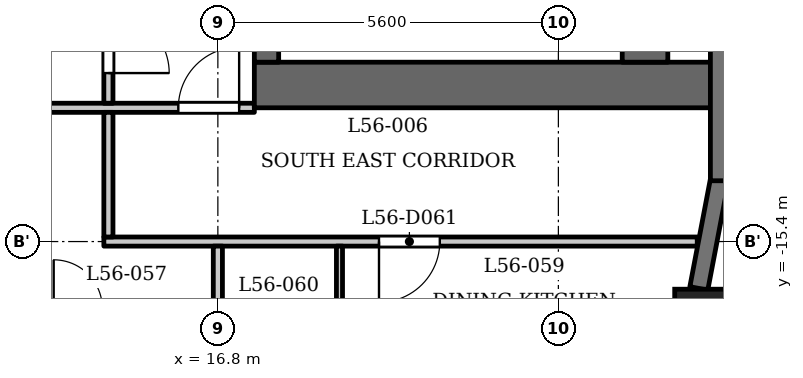
"""IFC4 building model, lengths in metres.
Left out: names, types, materials, properties, quantities, classifications, styles, units other than length and angle.
Written with IfcOpenShell. Run it as: python <this file> out.ifc"""

import sys

from ifc_helpers import new_model, si_unit, direction, frame, frame_2d, origin, origin_2d, place, context, subcontext, project, spatial, rectangle, extrude, element, fill, save


model = new_model("IFC4")
c1 = context("Model", 3, precision=1e-05, world=origin(), true_north=direction((0.0, 1.0)))
c2 = subcontext(c1, "Body", "Model", "MODEL_VIEW")
j1 = project(units=[si_unit("LENGTHUNIT", "METRE"), si_unit("PLANEANGLEUNIT", "RADIAN")], contexts=[c1])
p1 = place(None, origin())
s1 = spatial("IfcSite", under=j1, at=p1, CompositionType="ELEMENT")
p2 = place(p1, origin())
s2 = spatial("IfcBuilding", under=s1, at=p2, CompositionType="ELEMENT")
p3 = place(p2, frame((0.0, 0.0, 216.9)))
s3 = spatial("IfcBuildingStorey", under=s2, at=p3, CompositionType="ELEMENT", Elevation=216.9)
p4 = place(p3, frame((24.738, -16.609, 0.0), z_axis=(0.0, 0.0, 1.0), x_axis=(1.0, 0.0, 0.0)))
e1 = element("IfcColumn", 1, at=p4, inside=s3, PredefinedType="COLUMN", context=c2, shape_type="SweptSolid", body=[
    extrude(rectangle(XDim=0.85, YDim=0.85, at=origin_2d()), origin(), (0.0, 0.0, 1.0), 3.5),
])
p5 = place(p3, frame((24.709, -16.171, 0.0), z_axis=(0.0, 0.0, 1.0), x_axis=(0.187442908742, 0.982275499014, 0.0)))
e2 = element("IfcWall", 2, at=p5, inside=s3, PredefinedType="SOLIDWALL", context=c2, shape_type="SweptSolid", body=[
    extrude(rectangle(XDim=1.831, YDim=0.3, at=frame_2d((0.916, 0.0))), origin(), (0.0, 0.0, 1.0), 2.5),
])
p6 = place(p3, frame((25.05, -14.4, 0.0), z_axis=(0.0, 0.0, 1.0), x_axis=(0.0, 1.0, 0.0)))
e3 = element("IfcWall", 3, at=p6, inside=s3, PredefinedType="SOLIDWALL", context=c2, shape_type="SweptSolid", body=[
    extrude(rectangle(XDim=2.775, YDim=0.3, at=frame_2d((1.387, 0.0))), origin(), (0.0, 0.0, 1.0), 2.5),
])
p7 = place(p3, frame((17.4, -12.825, 0.0), z_axis=(0.0, 0.0, 1.0), x_axis=(1.0, 0.0, 0.0)))
e4 = element("IfcWall", 4, at=p7, inside=s3, PredefinedType="SHEAR", context=c2, shape_type="SweptSolid", body=[
    extrude(rectangle(XDim=7.6, YDim=0.75, at=frame_2d((3.8, 0.0))), origin(), (0.0, 0.0, 1.0), 3.2),
])
p8 = place(p3, frame((17.6, -12.45, 0.0), z_axis=(0.0, 0.0, 1.0), x_axis=(0.0, 1.0, 0.0)))
e5 = element("IfcWall", 5, at=p8, inside=s3, PredefinedType="SHEAR", context=c2, shape_type="SweptSolid", body=[
    extrude(rectangle(XDim=24.9, YDim=0.4, at=frame_2d((12.45, 0.0))), origin(), (0.0, 0.0, 1.0), 3.2),
])
p9 = place(p8, frame((6.85, 0.0, 0.0)))
e6 = element("IfcOpeningElement", 6, at=p9, cuts=e5, PredefinedType="OPENING", context=c2, shape_type="SweptSolid", body=[
    extrude(rectangle(XDim=0.9, YDim=2.1, at=frame_2d((0.45, 1.05))), frame((0.0, 0.21, 0.0), z_axis=(0.0, -1.0, 0.0), x_axis=(1.0, 0.0, 0.0)), (0.0, 0.0, 1.0), 0.42),
])
p10 = place(p8, frame((10.45, 0.0, 0.0)))
e7 = element("IfcOpeningElement", 7, at=p10, cuts=e5, PredefinedType="OPENING", context=c2, shape_type="SweptSolid", body=[
    extrude(rectangle(XDim=0.9, YDim=2.1, at=frame_2d((0.45, 1.05))), frame((0.0, 0.21, 0.0), z_axis=(0.0, -1.0, 0.0), x_axis=(1.0, 0.0, 0.0)), (0.0, 0.0, 1.0), 0.42),
])
p11 = place(p8, frame((15.6, 0.0, 0.0)))
e8 = element("IfcOpeningElement", 8, at=p11, cuts=e5, PredefinedType="OPENING", context=c2, shape_type="SweptSolid", body=[
    extrude(rectangle(XDim=1.1, YDim=2.1, at=frame_2d((0.55, 1.05))), frame((0.0, 0.21, 0.0), z_axis=(0.0, -1.0, 0.0), x_axis=(1.0, 0.0, 0.0)), (0.0, 0.0, 1.0), 0.42),
])
p12 = place(p8, frame((18.0, 0.0, 0.0)))
e9 = element("IfcOpeningElement", 9, at=p12, cuts=e5, PredefinedType="OPENING", context=c2, shape_type="SweptSolid", body=[
    extrude(rectangle(XDim=1.1, YDim=2.1, at=frame_2d((0.55, 1.05))), frame((0.0, 0.21, 0.0), z_axis=(0.0, -1.0, 0.0), x_axis=(1.0, 0.0, 0.0)), (0.0, 0.0, 1.0), 0.42),
])
p13 = place(p8, frame((23.025, 0.0, 0.0)))
e10 = element("IfcOpeningElement", 10, at=p13, cuts=e5, PredefinedType="OPENING", context=c2, shape_type="SweptSolid", body=[
    extrude(rectangle(XDim=1.1, YDim=2.1, at=frame_2d((0.55, 1.05))), frame((0.0, 0.21, 0.0), z_axis=(0.0, -1.0, 0.0), x_axis=(1.0, 0.0, 0.0)), (0.0, 0.0, 1.0), 0.42),
])
p14 = place(p8, frame((0.775, 0.0, 0.0)))
e11 = element("IfcOpeningElement", 11, at=p14, cuts=e5, PredefinedType="OPENING", context=c2, shape_type="SweptSolid", body=[
    extrude(rectangle(XDim=1.1, YDim=2.1, at=frame_2d((0.55, 1.05))), frame((0.0, 0.21, 0.0), z_axis=(0.0, -1.0, 0.0), x_axis=(1.0, 0.0, 0.0)), (0.0, 0.0, 1.0), 0.42),
])
p15 = place(p8, frame((12.925, 0.0, 0.0)))
e12 = element("IfcOpeningElement", 12, at=p15, cuts=e5, PredefinedType="OPENING", context=c2, shape_type="SweptSolid", body=[
    extrude(rectangle(XDim=1.8, YDim=2.1, at=frame_2d((0.9, 1.05))), frame((0.0, 0.21, 0.0), z_axis=(0.0, -1.0, 0.0), x_axis=(1.0, 0.0, 0.0)), (0.0, 0.0, 1.0), 0.42),
])
p16 = place(p3, frame((23.825, -12.45, 0.0), z_axis=(0.0, 0.0, 1.0), x_axis=(0.0, 1.0, 0.0)))
e13 = element("IfcWall", 13, at=p16, inside=s3, PredefinedType="SHEAR", context=c2, shape_type="SweptSolid", body=[
    extrude(rectangle(XDim=24.9, YDim=0.75, at=frame_2d((12.45, 0.0))), origin(), (0.0, 0.0, 1.0), 3.2),
])
p17 = place(p3, frame((14.925, -15.4, 0.0), z_axis=(0.0, 0.0, 1.0), x_axis=(1.0, 0.0, 0.0)))
e14 = element("IfcWall", 14, at=p17, inside=s3, PredefinedType="PARTITIONING", context=c2, shape_type="SweptSolid", body=[
    extrude(rectangle(XDim=9.759, YDim=0.15, at=frame_2d((4.879, 0.0))), origin(), (0.0, 0.0, 1.0), 3.2),
])
p18 = place(p17, frame((4.525, 0.0, 0.0)))
e15 = element("IfcOpeningElement", 15, at=p18, cuts=e14, PredefinedType="OPENING", context=c2, shape_type="SweptSolid", body=[
    extrude(rectangle(XDim=1.0, YDim=2.1, at=frame_2d((0.5, 1.05))), frame((0.0, 0.085, 0.0), z_axis=(0.0, -1.0, 0.0), x_axis=(1.0, 0.0, 0.0)), (0.0, 0.0, 1.0), 0.17),
])
p19 = place(p3, frame((-17.4, -13.2, 0.0), z_axis=(0.0, 0.0, 1.0), x_axis=(1.0, 0.0, 0.0)))
e16 = element("IfcWall", 16, at=p19, inside=s3, PredefinedType="PARTITIONING", context=c2, shape_type="SweptSolid", body=[
    extrude(rectangle(XDim=34.8, YDim=0.15, at=frame_2d((17.4, 0.0))), origin(), (0.0, 0.0, 1.0), 3.2),
])
p20 = place(p19, frame((0.15, 0.0, 0.0)))
e17 = element("IfcOpeningElement", 17, at=p20, cuts=e16, PredefinedType="OPENING", context=c2, shape_type="SweptSolid", body=[
    extrude(rectangle(XDim=1.0, YDim=2.1, at=frame_2d((0.5, 1.05))), frame((0.0, 0.085, 0.0), z_axis=(0.0, -1.0, 0.0), x_axis=(1.0, 0.0, 0.0)), (0.0, 0.0, 1.0), 0.17),
])
p21 = place(p19, frame((33.55, 0.0, 0.0)))
e18 = element("IfcOpeningElement", 18, at=p21, cuts=e16, PredefinedType="OPENING", context=c2, shape_type="SweptSolid", body=[
    extrude(rectangle(XDim=1.0, YDim=2.1, at=frame_2d((0.5, 1.05))), frame((0.0, 0.085, 0.0), z_axis=(0.0, -1.0, 0.0), x_axis=(1.0, 0.0, 0.0)), (0.0, 0.0, 1.0), 0.17),
])
p22 = place(p19, frame((3.7, 0.0, 0.0)))
e19 = element("IfcOpeningElement", 19, at=p22, cuts=e16, PredefinedType="OPENING", context=c2, shape_type="SweptSolid", body=[
    extrude(rectangle(XDim=1.0, YDim=2.1, at=frame_2d((0.5, 1.05))), frame((0.0, 0.085, 0.0), z_axis=(0.0, -1.0, 0.0), x_axis=(1.0, 0.0, 0.0)), (0.0, 0.0, 1.0), 0.17),
])
p23 = place(p19, frame((15.7, 0.0, 0.0)))
e20 = element("IfcOpeningElement", 20, at=p23, cuts=e16, PredefinedType="OPENING", context=c2, shape_type="SweptSolid", body=[
    extrude(rectangle(XDim=1.0, YDim=2.1, at=frame_2d((0.5, 1.05))), frame((0.0, 0.085, 0.0), z_axis=(0.0, -1.0, 0.0), x_axis=(1.0, 0.0, 0.0)), (0.0, 0.0, 1.0), 0.17),
])
p24 = place(p19, frame((21.3, 0.0, 0.0)))
e21 = element("IfcOpeningElement", 21, at=p24, cuts=e16, PredefinedType="OPENING", context=c2, shape_type="SweptSolid", body=[
    extrude(rectangle(XDim=1.0, YDim=2.1, at=frame_2d((0.5, 1.05))), frame((0.0, 0.085, 0.0), z_axis=(0.0, -1.0, 0.0), x_axis=(1.0, 0.0, 0.0)), (0.0, 0.0, 1.0), 0.17),
])
p25 = place(p19, frame((29.5, 0.0, 0.0)))
e22 = element("IfcOpeningElement", 22, at=p25, cuts=e16, PredefinedType="OPENING", context=c2, shape_type="SweptSolid", body=[
    extrude(rectangle(XDim=1.0, YDim=2.1, at=frame_2d((0.5, 1.05))), frame((0.0, 0.085, 0.0), z_axis=(0.0, -1.0, 0.0), x_axis=(1.0, 0.0, 0.0)), (0.0, 0.0, 1.0), 0.17),
])
p26 = place(p3, frame((15.0, -15.325, 0.0), z_axis=(0.0, 0.0, 1.0), x_axis=(0.0, 1.0, 0.0)))
e23 = element("IfcWall", 23, at=p26, inside=s3, PredefinedType="PARTITIONING", context=c2, shape_type="SweptSolid", body=[
    extrude(rectangle(XDim=2.05, YDim=0.15, at=frame_2d((1.025, 0.0))), origin(), (0.0, 0.0, 1.0), 3.2),
])
p27 = place(p3, frame((15.0, -13.125, 0.0), z_axis=(0.0, 0.0, 1.0), x_axis=(0.0, 1.0, 0.0)))
e24 = element("IfcWall", 24, at=p27, inside=s3, PredefinedType="PARTITIONING", context=c2, shape_type="SweptSolid", body=[
    extrude(rectangle(XDim=6.356, YDim=0.15, at=frame_2d((3.178, 0.0))), origin(), (0.0, 0.0, 1.0), 3.2),
])
p28 = place(p27, frame((0.496, 0.0, 0.0)))
e25 = element("IfcOpeningElement", 25, at=p28, cuts=e24, PredefinedType="OPENING", context=c2, shape_type="SweptSolid", body=[
    extrude(rectangle(XDim=1.0, YDim=2.1, at=frame_2d((0.5, 1.05))), frame((0.0, 0.085, 0.0), z_axis=(0.0, -1.0, 0.0), x_axis=(1.0, 0.0, 0.0)), (0.0, 0.0, 1.0), 0.17),
])
p29 = place(p3, frame((16.8, -22.31, 0.0), z_axis=(0.0, 0.0, 1.0), x_axis=(0.0, 1.0, 0.0)))
e26 = element("IfcWall", 26, at=p29, inside=s3, PredefinedType="PARTITIONING", context=c2, shape_type="SweptSolid", body=[
    extrude(rectangle(XDim=6.835, YDim=0.15, at=frame_2d((3.417, 0.0))), origin(), (0.0, 0.0, 1.0), 2.55),
])
p30 = place(p3, frame((18.8, -17.75, 0.0), z_axis=(0.0, 0.0, 1.0), x_axis=(0.0, 1.0, 0.0)))
e27 = element("IfcWall", 27, at=p30, inside=s3, PredefinedType="PARTITIONING", context=c2, shape_type="SweptSolid", body=[
    extrude(rectangle(XDim=2.275, YDim=0.1, at=frame_2d((1.137, 0.0))), origin(), (0.0, 0.0, 1.0), 3.2),
])
p31 = place(p28, origin())
e28 = element("IfcDoor", 28, at=p31, inside=s3, OperationType="SINGLE_SWING_LEFT", PredefinedType="DOOR", context=c2, shape_type="SweptSolid", body=[
    extrude(rectangle(XDim=1.0, YDim=2.1, at=frame_2d((0.5, 1.05))), frame((0.0, 0.025, 0.0), z_axis=(0.0, -1.0, 0.0), x_axis=(1.0, 0.0, 0.0)), (0.0, 0.0, 1.0), 0.05),
])
fill(e25, e28)
p32 = place(p21, origin())
e29 = element("IfcDoor", 29, at=p32, inside=s3, OperationType="SINGLE_SWING_LEFT", PredefinedType="DOOR", context=c2, shape_type="SweptSolid", body=[
    extrude(rectangle(XDim=1.0, YDim=2.1, at=frame_2d((0.5, 1.05))), frame((0.0, 0.025, 0.0), z_axis=(0.0, -1.0, 0.0), x_axis=(1.0, 0.0, 0.0)), (0.0, 0.0, 1.0), 0.05),
])
fill(e18, e29)
p33 = place(p18, origin())
e30 = element("IfcDoor", 30, at=p33, inside=s3, OperationType="SINGLE_SWING_LEFT", PredefinedType="DOOR", context=c2, shape_type="SweptSolid", body=[
    extrude(rectangle(XDim=1.0, YDim=2.1, at=frame_2d((0.5, 1.05))), frame((0.0, 0.025, 0.0), z_axis=(0.0, -1.0, 0.0), x_axis=(1.0, 0.0, 0.0)), (0.0, 0.0, 1.0), 0.05),
])
fill(e15, e30)
save(model, sys.argv[1])
